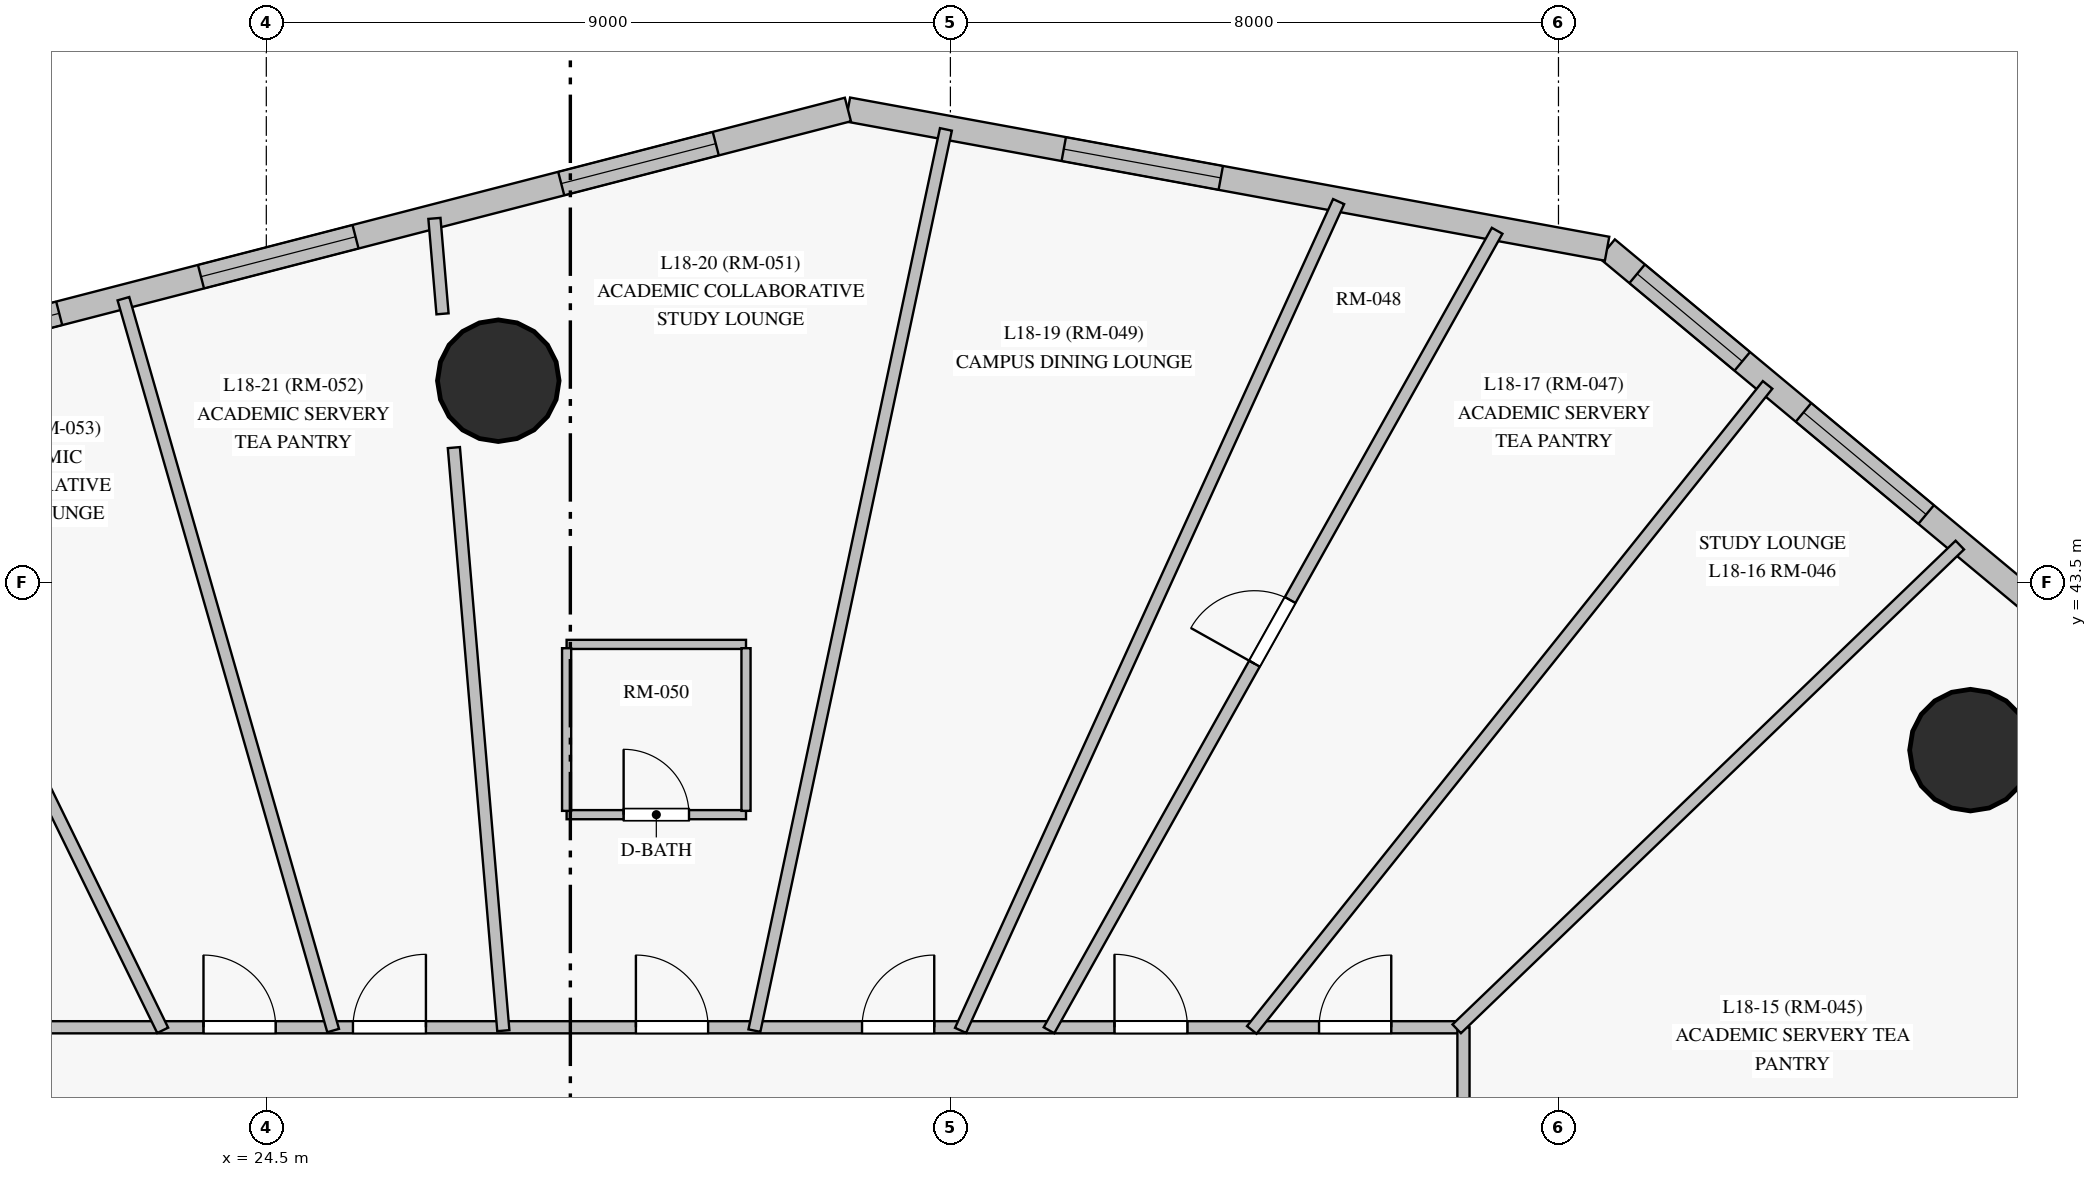
"""IFC4 building model, lengths in metres.
Left out: names, types, materials, properties, quantities, classifications, styles, units other than length and angle.
Written with IfcOpenShell. Run it as: python <this file> out.ifc"""

import sys

from ifc_helpers import new_model, si_unit, direction, frame, frame_2d, origin, origin_with_axes, origin_2d, place, context, subcontext, project, spatial, rectangle, circle, extrude, source, transform, mapped, element, fill, save


model = new_model("IFC4")
c1 = context("Model", 3, precision=1e-05, world=origin(), true_north=direction((0.0, 1.0)))
c2 = subcontext(c1, "Body", "Model", "MODEL_VIEW")
j1 = project(units=[si_unit("LENGTHUNIT", "METRE"), si_unit("PLANEANGLEUNIT", "RADIAN")], contexts=[c1])
p1 = place(None, origin())
s1 = spatial("IfcSite", under=j1, at=p1, CompositionType="ELEMENT")
p2 = place(p1, origin())
s2 = spatial("IfcBuilding", under=s1, at=p2, CompositionType="ELEMENT")
p3 = place(p2, frame((0.0, 0.0, 69.7)))
s3 = spatial("IfcBuildingStorey", under=s2, at=p3, CompositionType="ELEMENT", Elevation=69.7)
m1 = source(origin_with_axes(), c2, "Body", "SweptSolid", [
    extrude(circle(Radius=0.8, at=origin_2d()), origin(), (0.0, 0.0, 1.0), 3.6),
])
for number, where, z_axis, x_axis in (
    (1, (46.92, 41.296, 0.0), (0.0, 0.0, 1.0), (1.0, 0.0, 0.0)),
    (2, (27.552, 46.156, 0.0), (0.0, 0.0, 1.0), (1.0, 0.0, 0.0)),
):
    element("IfcColumn", number, at=place(p3, frame(where, z_axis=z_axis, x_axis=x_axis)), inside=s3, PredefinedType="COLUMN", context=c2, shape_type="MappedRepresentation", body=[
        mapped(m1, transform((0.0, 0.0, 0.0), scale=1.0)),
    ])
p4 = place(p3, frame((47.787, 43.188, 0.0), z_axis=(0.0, 0.0, 1.0), x_axis=(-0.768362839107, 0.640014490054, 0.0)))
e3 = element("IfcWall", 3, at=p4, inside=s3, PredefinedType="SOLIDWALL", context=c2, shape_type="SweptSolid", body=[
    extrude(rectangle(XDim=7.35, YDim=0.32, at=frame_2d((3.675, 0.0))), origin(), (0.0, 0.0, 1.0), 3.35),
])
p5 = place(p4, frame((1.886, 0.0, 0.85)))
e4 = element("IfcOpeningElement", 4, at=p5, cuts=e3, PredefinedType="OPENING", context=c2, shape_type="SweptSolid", body=[
    extrude(rectangle(XDim=2.1, YDim=1.95, at=frame_2d((1.05, 0.975))), frame((0.0, 0.17, 0.0), z_axis=(0.0, -1.0, 0.0), x_axis=(1.0, 0.0, 0.0)), (0.0, 0.0, 1.0), 0.34),
])
p6 = place(p4, frame((5.035, 0.0, 0.85)))
e5 = element("IfcOpeningElement", 5, at=p6, cuts=e3, PredefinedType="OPENING", context=c2, shape_type="SweptSolid", body=[
    extrude(rectangle(XDim=1.8, YDim=1.85, at=frame_2d((0.9, 0.925))), frame((0.0, 0.17, 0.0), z_axis=(0.0, -1.0, 0.0), x_axis=(1.0, 0.0, 0.0)), (0.0, 0.0, 1.0), 0.34),
])
p7 = place(p3, frame((42.139, 47.892, 0.0), z_axis=(0.0, 0.0, 1.0), x_axis=(-0.983594472343, 0.180393774774, 0.0)))
e6 = element("IfcWall", 6, at=p7, inside=s3, PredefinedType="SOLIDWALL", context=c2, shape_type="SweptSolid", body=[
    extrude(rectangle(XDim=10.154, YDim=0.32, at=frame_2d((5.077, 0.0))), origin(), (0.0, 0.0, 1.0), 3.35),
])
p8 = place(p7, frame((5.167, 0.0, 0.85)))
e7 = element("IfcOpeningElement", 7, at=p8, cuts=e6, PredefinedType="OPENING", context=c2, shape_type="SweptSolid", body=[
    extrude(rectangle(XDim=2.1, YDim=1.95, at=frame_2d((1.05, 0.975))), frame((0.0, 0.17, 0.0), z_axis=(0.0, -1.0, 0.0), x_axis=(1.0, 0.0, 0.0)), (0.0, 0.0, 1.0), 0.34),
])
p9 = place(p3, frame((32.152, 49.724, 0.0), z_axis=(0.0, 0.0, 1.0), x_axis=(-0.968190331719, -0.250214870793, 0.0)))
e8 = element("IfcWall", 8, at=p9, inside=s3, PredefinedType="SOLIDWALL", context=c2, shape_type="SweptSolid", body=[
    extrude(rectangle(XDim=14.729, YDim=0.32, at=frame_2d((7.365, 0.0))), origin(), (0.0, 0.0, 1.0), 3.35),
])
p10 = place(p9, frame((1.795, 0.0, 0.85)))
e9 = element("IfcOpeningElement", 9, at=p10, cuts=e8, PredefinedType="OPENING", context=c2, shape_type="SweptSolid", body=[
    extrude(rectangle(XDim=2.1, YDim=1.95, at=frame_2d((1.05, 0.975))), frame((0.0, 0.17, 0.0), z_axis=(0.0, -1.0, 0.0), x_axis=(1.0, 0.0, 0.0)), (0.0, 0.0, 1.0), 0.34),
])
p11 = place(p9, frame((6.691, 0.0, 0.85)))
e10 = element("IfcOpeningElement", 10, at=p11, cuts=e8, PredefinedType="OPENING", context=c2, shape_type="SweptSolid", body=[
    extrude(rectangle(XDim=2.1, YDim=1.95, at=frame_2d((1.05, 0.975))), frame((0.0, 0.17, 0.0), z_axis=(0.0, -1.0, 0.0), x_axis=(1.0, 0.0, 0.0)), (0.0, 0.0, 1.0), 0.34),
])
p12 = place(p9, frame((10.717, 0.0, 0.85)))
e11 = element("IfcOpeningElement", 11, at=p12, cuts=e8, PredefinedType="OPENING", context=c2, shape_type="SweptSolid", body=[
    extrude(rectangle(XDim=2.1, YDim=1.95, at=frame_2d((1.05, 0.975))), frame((0.0, 0.17, 0.0), z_axis=(0.0, -1.0, 0.0), x_axis=(1.0, 0.0, 0.0)), (0.0, 0.0, 1.0), 0.34),
])
p13 = place(p3, frame((10.5, 37.65, 0.0), z_axis=(0.0, 0.0, 1.0), x_axis=(1.0, 0.0, 0.0)))
e12 = element("IfcWall", 12, at=p13, inside=s3, PredefinedType="PARTITIONING", context=c2, shape_type="SweptSolid", body=[
    extrude(rectangle(XDim=29.75, YDim=0.16, at=frame_2d((14.875, 0.0))), origin(), (0.0, 0.0, 1.0), 2.75),
])
p14 = place(p13, frame((27.85, 0.0, 0.0)))
e13 = element("IfcOpeningElement", 13, at=p14, cuts=e12, PredefinedType="OPENING", context=c2, shape_type="SweptSolid", body=[
    extrude(rectangle(XDim=0.95, YDim=2.15, at=frame_2d((0.475, 1.075))), frame((0.0, 0.09, 0.0), z_axis=(0.0, -1.0, 0.0), x_axis=(1.0, 0.0, 0.0)), (0.0, 0.0, 1.0), 0.18),
])
p15 = place(p13, frame((25.159, 0.0, 0.0)))
e14 = element("IfcOpeningElement", 14, at=p15, cuts=e12, PredefinedType="OPENING", context=c2, shape_type="SweptSolid", body=[
    extrude(rectangle(XDim=0.96, YDim=2.15, at=frame_2d((0.48, 1.075))), frame((0.0, 0.09, 0.0), z_axis=(0.0, -1.0, 0.0), x_axis=(1.0, 0.0, 0.0)), (0.0, 0.0, 1.0), 0.18),
])
p16 = place(p13, frame((21.837, 0.0, 0.0)))
e15 = element("IfcOpeningElement", 15, at=p16, cuts=e12, PredefinedType="OPENING", context=c2, shape_type="SweptSolid", body=[
    extrude(rectangle(XDim=0.95, YDim=2.15, at=frame_2d((0.475, 1.075))), frame((0.0, 0.09, 0.0), z_axis=(0.0, -1.0, 0.0), x_axis=(1.0, 0.0, 0.0)), (0.0, 0.0, 1.0), 0.18),
])
p17 = place(p13, frame((18.863, 0.0, 0.0)))
e16 = element("IfcOpeningElement", 16, at=p17, cuts=e12, PredefinedType="OPENING", context=c2, shape_type="SweptSolid", body=[
    extrude(rectangle(XDim=0.95, YDim=2.15, at=frame_2d((0.475, 1.075))), frame((0.0, 0.09, 0.0), z_axis=(0.0, -1.0, 0.0), x_axis=(1.0, 0.0, 0.0)), (0.0, 0.0, 1.0), 0.18),
])
p18 = place(p13, frame((15.14, 0.0, 0.0)))
e17 = element("IfcOpeningElement", 17, at=p18, cuts=e12, PredefinedType="OPENING", context=c2, shape_type="SweptSolid", body=[
    extrude(rectangle(XDim=0.96, YDim=2.15, at=frame_2d((0.48, 1.075))), frame((0.0, 0.09, 0.0), z_axis=(0.0, -1.0, 0.0), x_axis=(1.0, 0.0, 0.0)), (0.0, 0.0, 1.0), 0.18),
])
p19 = place(p13, frame((13.174, 0.0, 0.0)))
e18 = element("IfcOpeningElement", 18, at=p19, cuts=e12, PredefinedType="OPENING", context=c2, shape_type="SweptSolid", body=[
    extrude(rectangle(XDim=0.95, YDim=2.15, at=frame_2d((0.475, 1.075))), frame((0.0, 0.09, 0.0), z_axis=(0.0, -1.0, 0.0), x_axis=(1.0, 0.0, 0.0)), (0.0, 0.0, 1.0), 0.18),
])
p20 = place(p13, frame((9.938, 0.0, 0.0)))
e19 = element("IfcOpeningElement", 19, at=p20, cuts=e12, PredefinedType="OPENING", context=c2, shape_type="SweptSolid", body=[
    extrude(rectangle(XDim=0.95, YDim=2.15, at=frame_2d((0.475, 1.075))), frame((0.0, 0.09, 0.0), z_axis=(0.0, -1.0, 0.0), x_axis=(1.0, 0.0, 0.0)), (0.0, 0.0, 1.0), 0.18),
])
p21 = place(p3, frame((40.25, 37.65, 0.0), z_axis=(0.0, 0.0, 1.0), x_axis=(0.0, -1.0, 0.0)))
e20 = element("IfcWall", 20, at=p21, inside=s3, PredefinedType="PARTITIONING", context=c2, shape_type="SweptSolid", body=[
    extrude(rectangle(XDim=22.3, YDim=0.16, at=frame_2d((11.15, 0.0))), origin(), (0.0, 0.0, 1.0), 2.75),
])
p22 = place(p21, frame((14.02, 0.0, 0.0)))
e21 = element("IfcOpeningElement", 21, at=p22, cuts=e20, PredefinedType="OPENING", context=c2, shape_type="SweptSolid", body=[
    extrude(rectangle(XDim=0.96, YDim=2.15, at=frame_2d((0.48, 1.075))), frame((0.0, 0.09, 0.0), z_axis=(0.0, -1.0, 0.0), x_axis=(1.0, 0.0, 0.0)), (0.0, 0.0, 1.0), 0.18),
])
p23 = place(p21, frame((12.253, 0.0, 0.0)))
e22 = element("IfcOpeningElement", 22, at=p23, cuts=e20, PredefinedType="OPENING", context=c2, shape_type="SweptSolid", body=[
    extrude(rectangle(XDim=0.86, YDim=2.1, at=frame_2d((0.43, 1.05))), frame((0.0, 0.09, 0.0), z_axis=(0.0, -1.0, 0.0), x_axis=(1.0, 0.0, 0.0)), (0.0, 0.0, 1.0), 0.18),
])
p24 = place(p21, frame((10.675, 0.0, 0.0)))
e23 = element("IfcOpeningElement", 23, at=p24, cuts=e20, PredefinedType="OPENING", context=c2, shape_type="SweptSolid", body=[
    extrude(rectangle(XDim=0.95, YDim=2.15, at=frame_2d((0.475, 1.075))), frame((0.0, 0.09, 0.0), z_axis=(0.0, -1.0, 0.0), x_axis=(1.0, 0.0, 0.0)), (0.0, 0.0, 1.0), 0.18),
])
p25 = place(p21, frame((6.312, 0.0, 0.0)))
e24 = element("IfcOpeningElement", 24, at=p25, cuts=e20, PredefinedType="OPENING", context=c2, shape_type="SweptSolid", body=[
    extrude(rectangle(XDim=0.96, YDim=2.15, at=frame_2d((0.48, 1.075))), frame((0.0, 0.09, 0.0), z_axis=(0.0, -1.0, 0.0), x_axis=(1.0, 0.0, 0.0)), (0.0, 0.0, 1.0), 0.18),
])
p26 = place(p21, frame((2.271, 0.0, 0.0)))
e25 = element("IfcOpeningElement", 25, at=p26, cuts=e20, PredefinedType="OPENING", context=c2, shape_type="SweptSolid", body=[
    extrude(rectangle(XDim=0.96, YDim=2.15, at=frame_2d((0.48, 1.075))), frame((0.0, 0.09, 0.0), z_axis=(0.0, -1.0, 0.0), x_axis=(1.0, 0.0, 0.0)), (0.0, 0.0, 1.0), 0.18),
])
p27 = place(p3, frame((30.921, 37.606, 0.0), z_axis=(0.0, 0.0, 1.0), x_axis=(0.207885013446, 0.978153270804, 0.0)))
e26 = element("IfcWall", 26, at=p27, inside=s3, PredefinedType="PARTITIONING", context=c2, shape_type="SweptSolid", body=[
    extrude(rectangle(XDim=12.121, YDim=0.16, at=frame_2d((6.061, 0.0))), origin(), (0.0, 0.0, 1.0), 3.35),
])
p28 = place(p3, frame((34.797, 37.611, 0.0), z_axis=(0.0, 0.0, 1.0), x_axis=(0.488974485782, 0.872298086811, 0.0)))
e27 = element("IfcWall", 27, at=p28, inside=s3, PredefinedType="PARTITIONING", context=c2, shape_type="SweptSolid", body=[
    extrude(rectangle(XDim=12.058, YDim=0.16, at=frame_2d((6.029, 0.0))), origin(), (0.0, 0.0, 1.0), 3.35),
])
p29 = place(p28, frame((5.529, 0.0, 0.0)))
e28 = element("IfcOpeningElement", 28, at=p29, cuts=e27, PredefinedType="OPENING", context=c2, shape_type="SweptSolid", body=[
    extrude(rectangle(XDim=0.96, YDim=2.15, at=frame_2d((0.48, 1.075))), frame((0.0, 0.09, 0.0), z_axis=(0.0, -1.0, 0.0), x_axis=(1.0, 0.0, 0.0)), (0.0, 0.0, 1.0), 0.18),
])
p30 = place(p3, frame((33.634, 37.609, 0.0), z_axis=(0.0, 0.0, 1.0), x_axis=(0.415044230095, 0.909801234921, 0.0)))
e29 = element("IfcWall", 29, at=p30, inside=s3, PredefinedType="PARTITIONING", context=c2, shape_type="SweptSolid", body=[
    extrude(rectangle(XDim=11.985, YDim=0.16, at=frame_2d((5.992, 0.0))), origin(), (0.0, 0.0, 1.0), 3.35),
])
p31 = place(p3, frame((37.465, 37.615, 0.0), z_axis=(0.0, 0.0, 1.0), x_axis=(0.624552549849, 0.780982786287, 0.0)))
e30 = element("IfcWall", 30, at=p31, inside=s3, PredefinedType="PARTITIONING", context=c2, shape_type="SweptSolid", body=[
    extrude(rectangle(XDim=10.865, YDim=0.16, at=frame_2d((5.433, 0.0))), origin(), (0.0, 0.0, 1.0), 3.35),
])
p32 = place(p3, frame((25.379, 37.607, 0.0), z_axis=(0.0, 0.0, 1.0), x_axis=(-0.275487246275, 0.961304726473, 0.0)))
e31 = element("IfcWall", 31, at=p32, inside=s3, PredefinedType="PARTITIONING", context=c2, shape_type="SweptSolid", body=[
    extrude(rectangle(XDim=10.016, YDim=0.16, at=frame_2d((5.008, 0.0))), origin(), (0.0, 0.0, 1.0), 3.35),
])
p33 = place(p3, frame((23.137, 37.61, 0.0), z_axis=(0.0, 0.0, 1.0), x_axis=(-0.439133840218, 0.898421655113, 0.0)))
e32 = element("IfcWall", 32, at=p33, inside=s3, PredefinedType="PARTITIONING", context=c2, shape_type="SweptSolid", body=[
    extrude(rectangle(XDim=9.643, YDim=0.16, at=frame_2d((4.821, 0.0))), origin(), (0.0, 0.0, 1.0), 3.35),
])
p34 = place(p3, frame((40.161, 37.629, 0.0), z_axis=(0.0, 0.0, 1.0), x_axis=(0.720836130308, 0.693105528216, 0.0)))
e33 = element("IfcWall", 33, at=p34, inside=s3, PredefinedType="PARTITIONING", context=c2, shape_type="SweptSolid", body=[
    extrude(rectangle(XDim=9.183, YDim=0.16, at=frame_2d((4.591, 0.0))), origin(), (0.0, 0.0, 1.0), 3.35),
])
p35 = place(p3, frame((27.618, 37.605, 0.0), z_axis=(0.0, 0.0, 1.0), x_axis=(-0.084549280714, 0.996419298855, 0.0)))
e34 = element("IfcWall", 34, at=p35, inside=s3, PredefinedType="PARTITIONING", context=c2, shape_type="SweptSolid", body=[
    extrude(rectangle(XDim=7.698, YDim=0.16, at=frame_2d((3.849, 0.0))), origin(), (0.0, 0.0, 1.0), 2.7),
])
p36 = place(p3, frame((28.451, 40.447, 0.0), z_axis=(0.0, 0.0, 1.0), x_axis=(1.0, 0.0, 0.0)))
e35 = element("IfcWall", 35, at=p36, inside=s3, PredefinedType="PARTITIONING", context=c2, shape_type="SweptSolid", body=[
    extrude(rectangle(XDim=2.36, YDim=0.12, at=frame_2d((1.18, 0.0))), origin(), (0.0, 0.0, 1.0), 2.75),
])
p37 = place(p36, frame((0.75, 0.0, 0.0)))
e36 = element("IfcOpeningElement", 36, at=p37, cuts=e35, PredefinedType="OPENING", context=c2, shape_type="SweptSolid", body=[
    extrude(rectangle(XDim=0.86, YDim=2.1, at=frame_2d((0.43, 1.05))), frame((0.0, 0.07, 0.0), z_axis=(0.0, -1.0, 0.0), x_axis=(1.0, 0.0, 0.0)), (0.0, 0.0, 1.0), 0.14),
])
p38 = place(p3, frame((30.811, 42.687, 0.0), z_axis=(0.0, 0.0, 1.0), x_axis=(-1.0, 0.0, 0.0)))
e37 = element("IfcWall", 37, at=p38, inside=s3, PredefinedType="PARTITIONING", context=c2, shape_type="SweptSolid", body=[
    extrude(rectangle(XDim=2.36, YDim=0.12, at=frame_2d((1.18, 0.0))), origin(), (0.0, 0.0, 1.0), 2.75),
])
for number, where, z_axis, x_axis in (
    (38, (30.811, 40.497, 0.0), (0.0, 0.0, 1.0), (0.0, 1.0, 0.0)),
    (39, (28.451, 42.637, 0.0), (0.0, 0.0, 1.0), (0.0, -1.0, 0.0)),
):
    element("IfcWall", number, at=place(p3, frame(where, z_axis=z_axis, x_axis=x_axis)), inside=s3, PredefinedType="PARTITIONING", context=c2, shape_type="SweptSolid", body=[
        extrude(rectangle(XDim=2.14, YDim=0.12, at=frame_2d((1.07, 0.0))), origin(), (0.0, 0.0, 1.0), 3.35),
    ])
p39 = place(p3, frame((26.818, 47.036, 0.0), z_axis=(0.0, 0.0, 1.0), x_axis=(-0.084472420092, 0.996425817732, 0.0)))
e40 = element("IfcWall", 40, at=p39, inside=s3, PredefinedType="PARTITIONING", context=c2, shape_type="SweptSolid", body=[
    extrude(rectangle(XDim=1.26, YDim=0.16, at=frame_2d((0.63, 0.0))), origin(), (0.0, 0.0, 1.0), 3.35),
])
m2 = source(origin_with_axes(), c2, "Body", "SweptSolid", [
    extrude(rectangle(XDim=2.1, YDim=1.95, at=frame_2d((1.05, 0.975))), frame((0.0, 0.03, 0.0), z_axis=(0.0, -1.0, 0.0), x_axis=(1.0, 0.0, 0.0)), (0.0, 0.0, 1.0), 0.06),
])
p40 = place(p5, origin())
e41 = element("IfcWindow", 41, at=p40, inside=s3, PartitioningType="SINGLE_PANEL", PredefinedType="WINDOW", context=c2, shape_type="MappedRepresentation", body=[
    mapped(m2, transform((0.0, 0.0, 0.0), scale=1.0)),
])
fill(e4, e41)
m3 = source(origin_with_axes(), c2, "Body", "SweptSolid", [
    extrude(rectangle(XDim=1.8, YDim=1.85, at=frame_2d((0.9, 0.925))), frame((0.0, 0.03, 0.0), z_axis=(0.0, -1.0, 0.0), x_axis=(1.0, 0.0, 0.0)), (0.0, 0.0, 1.0), 0.06),
])
p41 = place(p6, origin())
e42 = element("IfcWindow", 42, at=p41, inside=s3, PartitioningType="SINGLE_PANEL", PredefinedType="WINDOW", context=c2, shape_type="MappedRepresentation", body=[
    mapped(m3, transform((0.0, 0.0, 0.0), scale=1.0)),
])
fill(e5, e42)
p42 = place(p8, origin())
e43 = element("IfcWindow", 43, at=p42, inside=s3, PartitioningType="SINGLE_PANEL", PredefinedType="WINDOW", context=c2, shape_type="MappedRepresentation", body=[
    mapped(m2, transform((0.0, 0.0, 0.0), scale=1.0)),
])
fill(e7, e43)
p43 = place(p10, origin())
e44 = element("IfcWindow", 44, at=p43, inside=s3, PartitioningType="SINGLE_PANEL", PredefinedType="WINDOW", context=c2, shape_type="MappedRepresentation", body=[
    mapped(m2, transform((0.0, 0.0, 0.0), scale=1.0)),
])
fill(e9, e44)
p44 = place(p11, origin())
e45 = element("IfcWindow", 45, at=p44, inside=s3, PartitioningType="SINGLE_PANEL", PredefinedType="WINDOW", context=c2, shape_type="MappedRepresentation", body=[
    mapped(m2, transform((0.0, 0.0, 0.0), scale=1.0)),
])
fill(e10, e45)
p45 = place(p12, origin())
e46 = element("IfcWindow", 46, at=p45, inside=s3, PartitioningType="SINGLE_PANEL", PredefinedType="WINDOW", context=c2, shape_type="MappedRepresentation", body=[
    mapped(m2, transform((0.0, 0.0, 0.0), scale=1.0)),
])
fill(e11, e46)
m4 = source(origin_with_axes(), c2, "Body", "SweptSolid", [
    extrude(rectangle(XDim=0.86, YDim=2.1, at=frame_2d((0.43, 1.05))), frame((0.0, 0.025, 0.0), z_axis=(0.0, -1.0, 0.0), x_axis=(1.0, 0.0, 0.0)), (0.0, 0.0, 1.0), 0.05),
])
p46 = place(p37, origin())
e47 = element("IfcDoor", 47, at=p46, inside=s3, OperationType="SINGLE_SWING_LEFT", PredefinedType="DOOR", context=c2, shape_type="MappedRepresentation", body=[
    mapped(m4, transform((0.0, 0.0, 0.0), scale=1.0)),
])
fill(e36, e47)
m5 = source(origin_with_axes(), c2, "Body", "SweptSolid", [
    extrude(rectangle(XDim=0.95, YDim=2.15, at=frame_2d((0.475, 1.075))), frame((0.0, 0.025, 0.0), z_axis=(0.0, -1.0, 0.0), x_axis=(1.0, 0.0, 0.0)), (0.0, 0.0, 1.0), 0.05),
])
p47 = place(p14, origin())
e48 = element("IfcDoor", 48, at=p47, inside=s3, OperationType="SINGLE_SWING_RIGHT", PredefinedType="DOOR", context=c2, shape_type="MappedRepresentation", body=[
    mapped(m5, transform((0.0, 0.0, 0.0), scale=1.0)),
])
fill(e13, e48)
m6 = source(origin_with_axes(), c2, "Body", "SweptSolid", [
    extrude(rectangle(XDim=0.96, YDim=2.15, at=frame_2d((0.48, 1.075))), frame((0.0, 0.025, 0.0), z_axis=(0.0, -1.0, 0.0), x_axis=(1.0, 0.0, 0.0)), (0.0, 0.0, 1.0), 0.05),
])
p48 = place(p15, origin())
e49 = element("IfcDoor", 49, at=p48, inside=s3, OperationType="SINGLE_SWING_LEFT", PredefinedType="DOOR", context=c2, shape_type="MappedRepresentation", body=[
    mapped(m6, transform((0.0, 0.0, 0.0), scale=1.0)),
])
fill(e14, e49)
p49 = place(p16, origin())
e50 = element("IfcDoor", 50, at=p49, inside=s3, OperationType="SINGLE_SWING_RIGHT", PredefinedType="DOOR", context=c2, shape_type="MappedRepresentation", body=[
    mapped(m5, transform((0.0, 0.0, 0.0), scale=1.0)),
])
fill(e15, e50)
p50 = place(p17, origin())
e51 = element("IfcDoor", 51, at=p50, inside=s3, OperationType="SINGLE_SWING_LEFT", PredefinedType="DOOR", context=c2, shape_type="MappedRepresentation", body=[
    mapped(m5, transform((0.0, 0.0, 0.0), scale=1.0)),
])
fill(e16, e51)
p51 = place(p18, origin())
e52 = element("IfcDoor", 52, at=p51, inside=s3, OperationType="SINGLE_SWING_RIGHT", PredefinedType="DOOR", context=c2, shape_type="MappedRepresentation", body=[
    mapped(m6, transform((0.0, 0.0, 0.0), scale=1.0)),
])
fill(e17, e52)
p52 = place(p19, origin())
e53 = element("IfcDoor", 53, at=p52, inside=s3, OperationType="SINGLE_SWING_LEFT", PredefinedType="DOOR", context=c2, shape_type="MappedRepresentation", body=[
    mapped(m5, transform((0.0, 0.0, 0.0), scale=1.0)),
])
fill(e18, e53)
p53 = place(p29, origin())
e54 = element("IfcDoor", 54, at=p53, inside=s3, OperationType="SINGLE_SWING_LEFT", PredefinedType="DOOR", context=c2, shape_type="MappedRepresentation", body=[
    mapped(m6, transform((0.0, 0.0, 0.0), scale=1.0)),
])
fill(e28, e54)
save(model, sys.argv[1])
